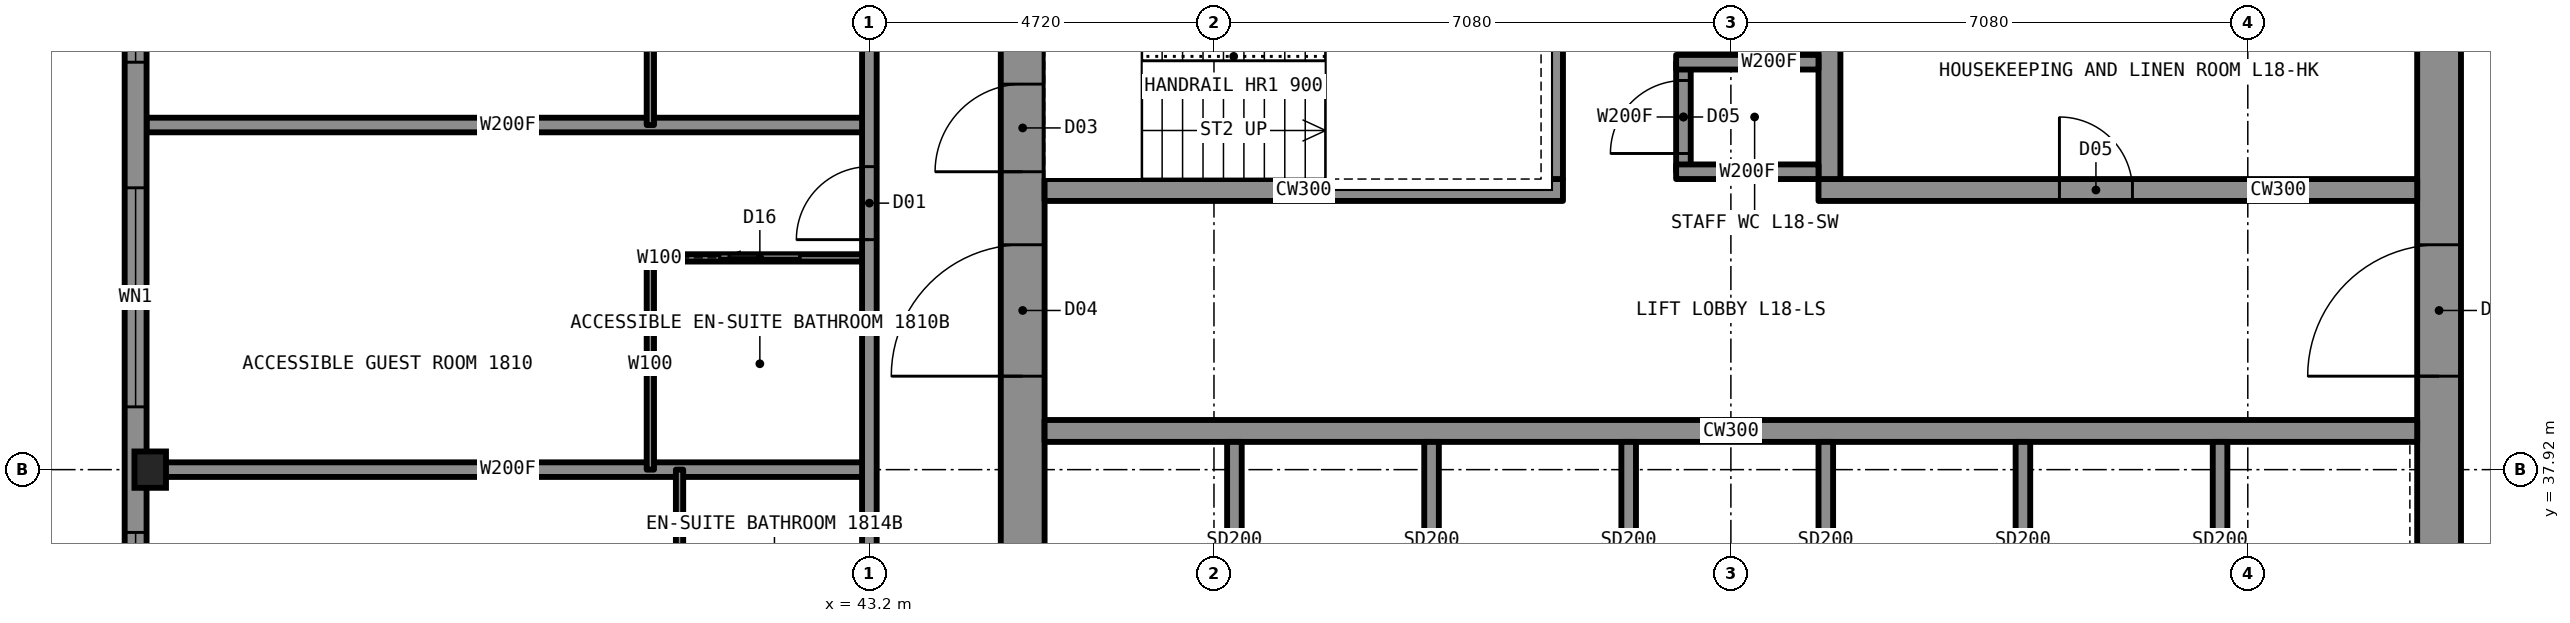
"""IFC4 building model, lengths in metres.
Left out: names, types, materials, properties, quantities, classifications, styles, units other than length and angle.
Written with IfcOpenShell. Run it as: python <this file> out.ifc"""

import sys

from ifc_helpers import new_model, si_unit, direction, frame, frame_2d, origin, origin_2d, place, context, subcontext, project, spatial, rectangle, i_section, extrude, element, fill, save


model = new_model("IFC4")
c1 = context("Model", 3, precision=1e-05, world=origin(), true_north=direction((0.0, 1.0)))
c2 = subcontext(c1, "Body", "Model", "MODEL_VIEW")
j1 = project(units=[si_unit("LENGTHUNIT", "METRE"), si_unit("PLANEANGLEUNIT", "RADIAN")], contexts=[c1])
p1 = place(None, origin())
s1 = spatial("IfcSite", under=j1, at=p1, CompositionType="ELEMENT")
p2 = place(p1, origin())
s2 = spatial("IfcBuilding", under=s1, at=p2, CompositionType="ELEMENT")
p3 = place(p2, frame((0.0, 0.0, 70.5)))
s3 = spatial("IfcBuildingStorey", under=s2, at=p3, CompositionType="ELEMENT", Elevation=70.5)
p4 = place(p3, frame((33.35, 37.92, 0.0), z_axis=(0.0, 0.0, 1.0), x_axis=(1.0, 0.0, 0.0)))
e1 = element("IfcColumn", 1, at=p4, inside=s3, PredefinedType="COLUMN", context=c2, shape_type="SweptSolid", body=[
    extrude(i_section(OverallWidth=0.432, OverallDepth=0.498, WebThickness=0.056, FlangeThickness=0.089, at=origin_2d()), origin(), (0.0, 0.0, 1.0), 3.5),
])
p5 = place(p3, frame((64.7, 35.6, 0.0), z_axis=(0.0, 0.0, 1.0), x_axis=(0.0, 1.0, 0.0)))
e2 = element("IfcWall", 2, at=p5, inside=s3, PredefinedType="SHEAR", context=c2, shape_type="SweptSolid", body=[
    extrude(rectangle(XDim=18.8, YDim=0.6, at=frame_2d((9.4, 0.0))), origin(), (0.0, 0.0, 1.0), 3.5),
])
p6 = place(p5, frame((13.4, 0.0, 0.0)))
e3 = element("IfcOpeningElement", 3, at=p6, cuts=e2, PredefinedType="OPENING", context=c2, shape_type="SweptSolid", body=[
    extrude(rectangle(XDim=1.8, YDim=2.2, at=frame_2d((0.9, 1.1))), frame((0.0, 0.31, 0.0), z_axis=(0.0, -1.0, 0.0), x_axis=(1.0, 0.0, 0.0)), (0.0, 0.0, 1.0), 0.62),
])
p7 = place(p5, frame((3.6, 0.0, 0.0)))
e4 = element("IfcOpeningElement", 4, at=p7, cuts=e2, PredefinedType="OPENING", context=c2, shape_type="SweptSolid", body=[
    extrude(rectangle(XDim=1.8, YDim=2.2, at=frame_2d((0.9, 1.1))), frame((0.0, 0.31, 0.0), z_axis=(0.0, -1.0, 0.0), x_axis=(1.0, 0.0, 0.0)), (0.0, 0.0, 1.0), 0.62),
])
p8 = place(p3, frame((45.3, 35.6, 0.0), z_axis=(0.0, 0.0, 1.0), x_axis=(0.0, 1.0, 0.0)))
e5 = element("IfcWall", 5, at=p8, inside=s3, PredefinedType="SHEAR", context=c2, shape_type="SweptSolid", body=[
    extrude(rectangle(XDim=18.8, YDim=0.6, at=frame_2d((9.4, 0.0))), origin(), (0.0, 0.0, 1.0), 3.5),
])
p9 = place(p8, frame((13.4, 0.0, 0.0)))
e6 = element("IfcOpeningElement", 6, at=p9, cuts=e5, PredefinedType="OPENING", context=c2, shape_type="SweptSolid", body=[
    extrude(rectangle(XDim=1.8, YDim=2.2, at=frame_2d((0.9, 1.1))), frame((0.0, 0.31, 0.0), z_axis=(0.0, -1.0, 0.0), x_axis=(1.0, 0.0, 0.0)), (0.0, 0.0, 1.0), 0.62),
])
p10 = place(p8, frame((3.6, 0.0, 0.0)))
e7 = element("IfcOpeningElement", 7, at=p10, cuts=e5, PredefinedType="OPENING", context=c2, shape_type="SweptSolid", body=[
    extrude(rectangle(XDim=1.8, YDim=2.2, at=frame_2d((0.9, 1.1))), frame((0.0, 0.31, 0.0), z_axis=(0.0, -1.0, 0.0), x_axis=(1.0, 0.0, 0.0)), (0.0, 0.0, 1.0), 0.62),
])
p11 = place(p8, frame((6.4, 0.0, 0.0)))
e8 = element("IfcOpeningElement", 8, at=p11, cuts=e5, PredefinedType="OPENING", context=c2, shape_type="SweptSolid", body=[
    extrude(rectangle(XDim=1.2, YDim=2.2, at=frame_2d((0.6, 1.1))), frame((0.0, 0.31, 0.0), z_axis=(0.0, -1.0, 0.0), x_axis=(1.0, 0.0, 0.0)), (0.0, 0.0, 1.0), 0.62),
])
p12 = place(p3, frame((45.6, 38.45, 0.0), z_axis=(0.0, 0.0, 1.0), x_axis=(1.0, 0.0, 0.0)))
e9 = element("IfcWall", 9, at=p12, inside=s3, PredefinedType="SHEAR", context=c2, shape_type="SweptSolid", body=[
    extrude(rectangle(XDim=18.8, YDim=0.3, at=frame_2d((9.4, 0.0))), origin(), (0.0, 0.0, 1.0), 3.5),
])
p13 = place(p3, frame((45.6, 41.75, 0.0), z_axis=(0.0, 0.0, 1.0), x_axis=(1.0, 0.0, 0.0)))
e10 = element("IfcWall", 10, at=p13, inside=s3, PredefinedType="SHEAR", context=c2, shape_type="SweptSolid", body=[
    extrude(rectangle(XDim=7.1, YDim=0.3, at=frame_2d((3.55, 0.0))), origin(), (0.0, 0.0, 1.0), 3.5),
])
p14 = place(p3, frame((56.2, 41.75, 0.0), z_axis=(0.0, 0.0, 1.0), x_axis=(1.0, 0.0, 0.0)))
e11 = element("IfcWall", 11, at=p14, inside=s3, PredefinedType="SHEAR", context=c2, shape_type="SweptSolid", body=[
    extrude(rectangle(XDim=8.2, YDim=0.3, at=frame_2d((4.1, 0.0))), origin(), (0.0, 0.0, 1.0), 3.5),
])
p15 = place(p14, frame((3.3, 0.0, 0.0)))
e12 = element("IfcOpeningElement", 12, at=p15, cuts=e11, PredefinedType="OPENING", context=c2, shape_type="SweptSolid", body=[
    extrude(rectangle(XDim=1.0, YDim=2.1, at=frame_2d((0.5, 1.05))), frame((0.0, 0.16, 0.0), z_axis=(0.0, -1.0, 0.0), x_axis=(1.0, 0.0, 0.0)), (0.0, 0.0, 1.0), 0.32),
])
p16 = place(p3, frame((52.55, 41.9, 0.0), z_axis=(0.0, 0.0, 1.0), x_axis=(0.0, 1.0, 0.0)))
e13 = element("IfcWall", 13, at=p16, inside=s3, PredefinedType="SHEAR", context=c2, shape_type="SweptSolid", body=[
    extrude(rectangle(XDim=6.2, YDim=0.3, at=frame_2d((3.1, 0.0))), origin(), (0.0, 0.0, 1.0), 3.5),
])
p17 = place(p16, frame((4.125, 0.0, 0.0)))
e14 = element("IfcOpeningElement", 14, at=p17, cuts=e13, PredefinedType="OPENING", context=c2, shape_type="SweptSolid", body=[
    extrude(rectangle(XDim=1.2, YDim=2.2, at=frame_2d((0.6, 1.1))), frame((0.0, 0.16, 0.0), z_axis=(0.0, -1.0, 0.0), x_axis=(1.0, 0.0, 0.0)), (0.0, 0.0, 1.0), 0.32),
])
p18 = place(p3, frame((56.35, 41.9, 0.0), z_axis=(0.0, 0.0, 1.0), x_axis=(0.0, 1.0, 0.0)))
e15 = element("IfcWall", 15, at=p18, inside=s3, PredefinedType="SHEAR", context=c2, shape_type="SweptSolid", body=[
    extrude(rectangle(XDim=9.5, YDim=0.3, at=frame_2d((4.75, 0.0))), origin(), (0.0, 0.0, 1.0), 3.5),
])
p19 = place(p18, frame((7.1, 0.0, 0.0)))
e16 = element("IfcOpeningElement", 16, at=p19, cuts=e15, PredefinedType="OPENING", context=c2, shape_type="SweptSolid", body=[
    extrude(rectangle(XDim=1.8, YDim=2.2, at=frame_2d((0.9, 1.1))), frame((0.0, 0.16, 0.0), z_axis=(0.0, -1.0, 0.0), x_axis=(1.0, 0.0, 0.0)), (0.0, 0.0, 1.0), 0.32),
])
p20 = place(p3, frame((33.3, 42.64, 0.0), z_axis=(0.0, 0.0, 1.0), x_axis=(1.0, 0.0, 0.0)))
e17 = element("IfcWall", 17, at=p20, inside=s3, PredefinedType="PARTITIONING", context=c2, shape_type="SweptSolid", body=[
    extrude(rectangle(XDim=9.9, YDim=0.2, at=frame_2d((4.95, 0.0))), origin(), (0.0, 0.0, 1.0), 2.723),
])
p21 = place(p3, frame((40.2, 40.82, 0.0), z_axis=(0.0, 0.0, 1.0), x_axis=(1.0, 0.0, 0.0)))
e18 = element("IfcWall", 18, at=p21, inside=s3, PredefinedType="PARTITIONING", context=c2, shape_type="SweptSolid", body=[
    extrude(rectangle(XDim=3.0, YDim=0.1, at=frame_2d((1.5, 0.0))), origin(), (0.0, 0.0, 1.0), 3.33),
])
p22 = place(p21, frame((0.95, 0.0, 0.0)))
e19 = element("IfcOpeningElement", 19, at=p22, cuts=e18, PredefinedType="OPENING", context=c2, shape_type="SweptSolid", body=[
    extrude(rectangle(XDim=1.1, YDim=2.1, at=frame_2d((0.55, 1.05))), frame((0.0, 0.06, 0.0), z_axis=(0.0, -1.0, 0.0), x_axis=(1.0, 0.0, 0.0)), (0.0, 0.0, 1.0), 0.12),
])
p23 = place(p3, frame((33.3, 37.92, 0.0), z_axis=(0.0, 0.0, 1.0), x_axis=(1.0, 0.0, 0.0)))
e20 = element("IfcWall", 20, at=p23, inside=s3, PredefinedType="PARTITIONING", context=c2, shape_type="SweptSolid", body=[
    extrude(rectangle(XDim=9.9, YDim=0.2, at=frame_2d((4.95, 0.0))), origin(), (0.0, 0.0, 1.0), 2.573),
])
p24 = place(p3, frame((43.2, 33.2, 0.0), z_axis=(0.0, 0.0, 1.0), x_axis=(0.0, 1.0, 0.0)))
e21 = element("IfcWall", 21, at=p24, inside=s3, PredefinedType="PARTITIONING", context=c2, shape_type="SweptSolid", body=[
    extrude(rectangle(XDim=23.6, YDim=0.2, at=frame_2d((11.8, 0.0))), origin(), (0.0, 0.0, 1.0), 3.33),
])
p25 = place(p24, frame((7.87, 0.0, 0.0)))
e22 = element("IfcOpeningElement", 22, at=p25, cuts=e21, PredefinedType="OPENING", context=c2, shape_type="SweptSolid", body=[
    extrude(rectangle(XDim=1.0, YDim=2.2, at=frame_2d((0.5, 1.1))), frame((0.0, 0.11, 0.0), z_axis=(0.0, -1.0, 0.0), x_axis=(1.0, 0.0, 0.0)), (0.0, 0.0, 1.0), 0.22),
])
p26 = place(p24, frame((12.44, 0.0, 0.0)))
e23 = element("IfcOpeningElement", 23, at=p26, cuts=e21, PredefinedType="OPENING", context=c2, shape_type="SweptSolid", body=[
    extrude(rectangle(XDim=1.0, YDim=2.2, at=frame_2d((0.5, 1.1))), frame((0.0, 0.11, 0.0), z_axis=(0.0, -1.0, 0.0), x_axis=(1.0, 0.0, 0.0)), (0.0, 0.0, 1.0), 0.22),
])
p27 = place(p24, frame((21.85, 0.0, 0.0)))
e24 = element("IfcOpeningElement", 24, at=p27, cuts=e21, PredefinedType="OPENING", context=c2, shape_type="SweptSolid", body=[
    extrude(rectangle(XDim=1.1, YDim=2.2, at=frame_2d((0.55, 1.1))), frame((0.0, 0.11, 0.0), z_axis=(0.0, -1.0, 0.0), x_axis=(1.0, 0.0, 0.0)), (0.0, 0.0, 1.0), 0.22),
])
p28 = place(p24, frame((0.66, 0.0, 0.0)))
e25 = element("IfcOpeningElement", 25, at=p28, cuts=e21, PredefinedType="OPENING", context=c2, shape_type="SweptSolid", body=[
    extrude(rectangle(XDim=1.1, YDim=2.2, at=frame_2d((0.55, 1.1))), frame((0.0, 0.11, 0.0), z_axis=(0.0, -1.0, 0.0), x_axis=(1.0, 0.0, 0.0)), (0.0, 0.0, 1.0), 0.22),
])
p29 = place(p3, frame((40.6, 35.32, 0.0), z_axis=(0.0, 0.0, 1.0), x_axis=(0.0, 1.0, 0.0)))
e26 = element("IfcWall", 26, at=p29, inside=s3, PredefinedType="PARTITIONING", context=c2, shape_type="SweptSolid", body=[
    extrude(rectangle(XDim=2.6, YDim=0.1, at=frame_2d((1.3, 0.0))), origin(), (0.0, 0.0, 1.0), 3.33),
])
p30 = place(p3, frame((40.2, 37.92, 0.0), z_axis=(0.0, 0.0, 1.0), x_axis=(0.0, 1.0, 0.0)))
e27 = element("IfcWall", 27, at=p30, inside=s3, PredefinedType="PARTITIONING", context=c2, shape_type="SweptSolid", body=[
    extrude(rectangle(XDim=2.9, YDim=0.1, at=frame_2d((1.45, 0.0))), origin(), (0.0, 0.0, 1.0), 3.33),
])
p31 = place(p3, frame((40.2, 42.64, 0.0), z_axis=(0.0, 0.0, 1.0), x_axis=(0.0, 1.0, 0.0)))
e28 = element("IfcWall", 28, at=p31, inside=s3, PredefinedType="PARTITIONING", context=c2, shape_type="SweptSolid", body=[
    extrude(rectangle(XDim=2.6, YDim=0.1, at=frame_2d((1.3, 0.0))), origin(), (0.0, 0.0, 1.0), 3.33),
])
p32 = place(p3, frame((54.35, 42.0, 0.0), z_axis=(0.0, 0.0, 1.0), x_axis=(0.0, 1.0, 0.0)))
e29 = element("IfcWall", 29, at=p32, inside=s3, PredefinedType="PARTITIONING", context=c2, shape_type="SweptSolid", body=[
    extrude(rectangle(XDim=1.5, YDim=0.2, at=frame_2d((0.75, 0.0))), origin(), (0.0, 0.0, 1.0), 3.33),
])
p33 = place(p32, frame((0.25, 0.0, 0.0)))
e30 = element("IfcOpeningElement", 30, at=p33, cuts=e29, PredefinedType="OPENING", context=c2, shape_type="SweptSolid", body=[
    extrude(rectangle(XDim=1.0, YDim=2.1, at=frame_2d((0.5, 1.05))), frame((0.0, 0.11, 0.0), z_axis=(0.0, -1.0, 0.0), x_axis=(1.0, 0.0, 0.0)), (0.0, 0.0, 1.0), 0.22),
])
for number, where, z_axis, x_axis in (
    (31, (54.25, 42.0, 0.0), (0.0, 0.0, 1.0), (1.0, 0.0, 0.0)),
    (32, (54.25, 43.5, 0.0), (0.0, 0.0, 1.0), (1.0, 0.0, 0.0)),
):
    element("IfcWall", number, at=place(p3, frame(where, z_axis=z_axis, x_axis=x_axis)), inside=s3, PredefinedType="PARTITIONING", context=c2, shape_type="SweptSolid", body=[
        extrude(rectangle(XDim=1.95, YDim=0.2, at=frame_2d((0.975, 0.0))), origin(), (0.0, 0.0, 1.0), 3.33),
    ])
p34 = place(p3, frame((33.15, 61.5, 0.0), z_axis=(0.0, 0.0, 1.0), x_axis=(0.0, -1.0, 0.0)))
e33 = element("IfcWall", 33, at=p34, inside=s3, PredefinedType="SOLIDWALL", context=c2, shape_type="SweptSolid", body=[
    extrude(rectangle(XDim=33.0, YDim=0.3, at=frame_2d((16.5, 0.0))), origin(), (0.0, 0.0, 1.0), 2.83),
])
p35 = place(p34, frame((0.85, 0.0, 0.5)))
e34 = element("IfcOpeningElement", 34, at=p35, cuts=e33, PredefinedType="OPENING", context=c2, shape_type="SweptSolid", body=[
    extrude(rectangle(XDim=2.9, YDim=2.0, at=frame_2d((1.45, 1.0))), frame((0.0, 0.16, 0.0), z_axis=(0.0, -1.0, 0.0), x_axis=(1.0, 0.0, 0.0)), (0.0, 0.0, 1.0), 0.32),
])
p36 = place(p34, frame((6.96, 0.0, 0.55)))
e35 = element("IfcOpeningElement", 35, at=p36, cuts=e33, PredefinedType="OPENING", context=c2, shape_type="SweptSolid", body=[
    extrude(rectangle(XDim=1.6, YDim=1.9, at=frame_2d((0.8, 0.95))), frame((0.0, 0.16, 0.0), z_axis=(0.0, -1.0, 0.0), x_axis=(1.0, 0.0, 0.0)), (0.0, 0.0, 1.0), 0.32),
])
p37 = place(p34, frame((10.28, 0.0, 0.5)))
e36 = element("IfcOpeningElement", 36, at=p37, cuts=e33, PredefinedType="OPENING", context=c2, shape_type="SweptSolid", body=[
    extrude(rectangle(XDim=3.0, YDim=2.0, at=frame_2d((1.5, 1.0))), frame((0.0, 0.16, 0.0), z_axis=(0.0, -1.0, 0.0), x_axis=(1.0, 0.0, 0.0)), (0.0, 0.0, 1.0), 0.32),
])
p38 = place(p34, frame((15.0, 0.0, 0.5)))
e37 = element("IfcOpeningElement", 37, at=p38, cuts=e33, PredefinedType="OPENING", context=c2, shape_type="SweptSolid", body=[
    extrude(rectangle(XDim=3.0, YDim=2.0, at=frame_2d((1.5, 1.0))), frame((0.0, 0.16, 0.0), z_axis=(0.0, -1.0, 0.0), x_axis=(1.0, 0.0, 0.0)), (0.0, 0.0, 1.0), 0.32),
])
p39 = place(p34, frame((19.72, 0.0, 0.5)))
e38 = element("IfcOpeningElement", 38, at=p39, cuts=e33, PredefinedType="OPENING", context=c2, shape_type="SweptSolid", body=[
    extrude(rectangle(XDim=3.0, YDim=2.0, at=frame_2d((1.5, 1.0))), frame((0.0, 0.16, 0.0), z_axis=(0.0, -1.0, 0.0), x_axis=(1.0, 0.0, 0.0)), (0.0, 0.0, 1.0), 0.32),
])
p40 = place(p34, frame((24.44, 0.0, 0.55)))
e39 = element("IfcOpeningElement", 39, at=p40, cuts=e33, PredefinedType="OPENING", context=c2, shape_type="SweptSolid", body=[
    extrude(rectangle(XDim=1.6, YDim=1.9, at=frame_2d((0.8, 0.95))), frame((0.0, 0.16, 0.0), z_axis=(0.0, -1.0, 0.0), x_axis=(1.0, 0.0, 0.0)), (0.0, 0.0, 1.0), 0.32),
])
p41 = place(p34, frame((29.25, 0.0, 0.5)))
e40 = element("IfcOpeningElement", 40, at=p41, cuts=e33, PredefinedType="OPENING", context=c2, shape_type="SweptSolid", body=[
    extrude(rectangle(XDim=2.9, YDim=2.0, at=frame_2d((1.45, 1.0))), frame((0.0, 0.16, 0.0), z_axis=(0.0, -1.0, 0.0), x_axis=(1.0, 0.0, 0.0)), (0.0, 0.0, 1.0), 0.32),
])
p42 = place(p34, frame((6.31, 0.0, 1.45)))
e41 = element("IfcOpeningElement", 41, at=p42, cuts=e33, PredefinedType="OPENING", context=c2, shape_type="SweptSolid", body=[
    extrude(rectangle(XDim=0.6, YDim=1.0, at=frame_2d((0.3, 0.5))), frame((0.0, 0.16, 0.0), z_axis=(0.0, -1.0, 0.0), x_axis=(1.0, 0.0, 0.0)), (0.0, 0.0, 1.0), 0.32),
])
p43 = place(p34, frame((26.04, 0.0, 1.45)))
e42 = element("IfcOpeningElement", 42, at=p43, cuts=e33, PredefinedType="OPENING", context=c2, shape_type="SweptSolid", body=[
    extrude(rectangle(XDim=0.6, YDim=1.0, at=frame_2d((0.3, 0.5))), frame((0.0, 0.16, 0.0), z_axis=(0.0, -1.0, 0.0), x_axis=(1.0, 0.0, 0.0)), (0.0, 0.0, 1.0), 0.32),
])
for number, where, z_axis, x_axis in (
    (43, (48.2, 35.6, 0.0), (0.0, 0.0, 1.0), (0.0, 1.0, 0.0)),
    (44, (50.9, 35.6, 0.0), (0.0, 0.0, 1.0), (0.0, 1.0, 0.0)),
    (45, (53.6, 35.6, 0.0), (0.0, 0.0, 1.0), (0.0, 1.0, 0.0)),
    (46, (56.3, 35.6, 0.0), (0.0, 0.0, 1.0), (0.0, 1.0, 0.0)),
    (47, (59.0, 35.6, 0.0), (0.0, 0.0, 1.0), (0.0, 1.0, 0.0)),
    (48, (61.7, 35.6, 0.0), (0.0, 0.0, 1.0), (0.0, 1.0, 0.0)),
):
    element("IfcWall", number, at=place(p3, frame(where, z_axis=z_axis, x_axis=x_axis)), inside=s3, PredefinedType="PARTITIONING", context=c2, shape_type="SweptSolid", body=[
        extrude(rectangle(XDim=2.7, YDim=0.2, at=frame_2d((1.35, 0.0))), origin(), (0.0, 0.0, 1.0), 3.33),
    ])
p44 = place(p25, origin())
e49 = element("IfcDoor", 49, at=p44, inside=s3, OperationType="SINGLE_SWING_LEFT", PredefinedType="DOOR", context=c2, shape_type="SweptSolid", body=[
    extrude(rectangle(XDim=1.0, YDim=2.2, at=frame_2d((0.5, 1.1))), frame((0.0, 0.025, 0.0), z_axis=(0.0, -1.0, 0.0), x_axis=(1.0, 0.0, 0.0)), (0.0, 0.0, 1.0), 0.05),
])
fill(e22, e49)
p45 = place(p22, origin())
e50 = element("IfcDoor", 50, at=p45, inside=s3, OperationType="SLIDING_TO_LEFT", PredefinedType="DOOR", context=c2, shape_type="SweptSolid", body=[
    extrude(rectangle(XDim=1.1, YDim=2.1, at=frame_2d((0.55, 1.05))), frame((0.0, 0.025, 0.0), z_axis=(0.0, -1.0, 0.0), x_axis=(1.0, 0.0, 0.0)), (0.0, 0.0, 1.0), 0.05),
])
fill(e19, e50)
p46 = place(p33, origin())
e51 = element("IfcDoor", 51, at=p46, inside=s3, OperationType="SINGLE_SWING_LEFT", PredefinedType="DOOR", context=c2, shape_type="SweptSolid", body=[
    extrude(rectangle(XDim=1.0, YDim=2.1, at=frame_2d((0.5, 1.05))), frame((0.0, 0.025, 0.0), z_axis=(0.0, -1.0, 0.0), x_axis=(1.0, 0.0, 0.0)), (0.0, 0.0, 1.0), 0.05),
])
fill(e30, e51)
p47 = place(p38, origin())
e52 = element("IfcWindow", 52, at=p47, inside=s3, PartitioningType="SINGLE_PANEL", PredefinedType="WINDOW", context=c2, shape_type="SweptSolid", body=[
    extrude(rectangle(XDim=3.0, YDim=2.0, at=frame_2d((1.5, 1.0))), frame((0.0, 0.03, 0.0), z_axis=(0.0, -1.0, 0.0), x_axis=(1.0, 0.0, 0.0)), (0.0, 0.0, 1.0), 0.06),
])
fill(e37, e52)
p48 = place(p39, origin())
e53 = element("IfcWindow", 53, at=p48, inside=s3, PartitioningType="SINGLE_PANEL", PredefinedType="WINDOW", context=c2, shape_type="SweptSolid", body=[
    extrude(rectangle(XDim=3.0, YDim=2.0, at=frame_2d((1.5, 1.0))), frame((0.0, 0.03, 0.0), z_axis=(0.0, -1.0, 0.0), x_axis=(1.0, 0.0, 0.0)), (0.0, 0.0, 1.0), 0.06),
])
fill(e38, e53)
p49 = place(p40, origin())
e54 = element("IfcWindow", 54, at=p49, inside=s3, PartitioningType="SINGLE_PANEL", PredefinedType="WINDOW", context=c2, shape_type="SweptSolid", body=[
    extrude(rectangle(XDim=1.6, YDim=1.9, at=frame_2d((0.8, 0.95))), frame((0.0, 0.03, 0.0), z_axis=(0.0, -1.0, 0.0), x_axis=(1.0, 0.0, 0.0)), (0.0, 0.0, 1.0), 0.06),
])
fill(e39, e54)
p50 = place(p10, origin())
e55 = element("IfcDoor", 55, at=p50, inside=s3, OperationType="DOUBLE_DOOR_SINGLE_SWING", PredefinedType="DOOR", context=c2, shape_type="SweptSolid", body=[
    extrude(rectangle(XDim=1.8, YDim=2.2, at=frame_2d((0.9, 1.1))), frame((0.0, 0.025, 0.0), z_axis=(0.0, -1.0, 0.0), x_axis=(1.0, 0.0, 0.0)), (0.0, 0.0, 1.0), 0.05),
])
fill(e7, e55)
p51 = place(p7, origin())
e56 = element("IfcDoor", 56, at=p51, inside=s3, OperationType="DOUBLE_DOOR_SINGLE_SWING", PredefinedType="DOOR", context=c2, shape_type="SweptSolid", body=[
    extrude(rectangle(XDim=1.8, YDim=2.2, at=frame_2d((0.9, 1.1))), frame((0.0, 0.025, 0.0), z_axis=(0.0, -1.0, 0.0), x_axis=(1.0, 0.0, 0.0)), (0.0, 0.0, 1.0), 0.05),
])
fill(e4, e56)
p52 = place(p11, origin())
e57 = element("IfcDoor", 57, at=p52, inside=s3, OperationType="SINGLE_SWING_LEFT", PredefinedType="DOOR", context=c2, shape_type="SweptSolid", body=[
    extrude(rectangle(XDim=1.2, YDim=2.2, at=frame_2d((0.6, 1.1))), frame((0.0, 0.025, 0.0), z_axis=(0.0, -1.0, 0.0), x_axis=(1.0, 0.0, 0.0)), (0.0, 0.0, 1.0), 0.05),
])
fill(e8, e57)
p53 = place(p15, origin())
e58 = element("IfcDoor", 58, at=p53, inside=s3, OperationType="SINGLE_SWING_LEFT", PredefinedType="DOOR", context=c2, shape_type="SweptSolid", body=[
    extrude(rectangle(XDim=1.0, YDim=2.1, at=frame_2d((0.5, 1.05))), frame((0.0, 0.025, 0.0), z_axis=(0.0, -1.0, 0.0), x_axis=(1.0, 0.0, 0.0)), (0.0, 0.0, 1.0), 0.05),
])
fill(e12, e58)
save(model, sys.argv[1])
